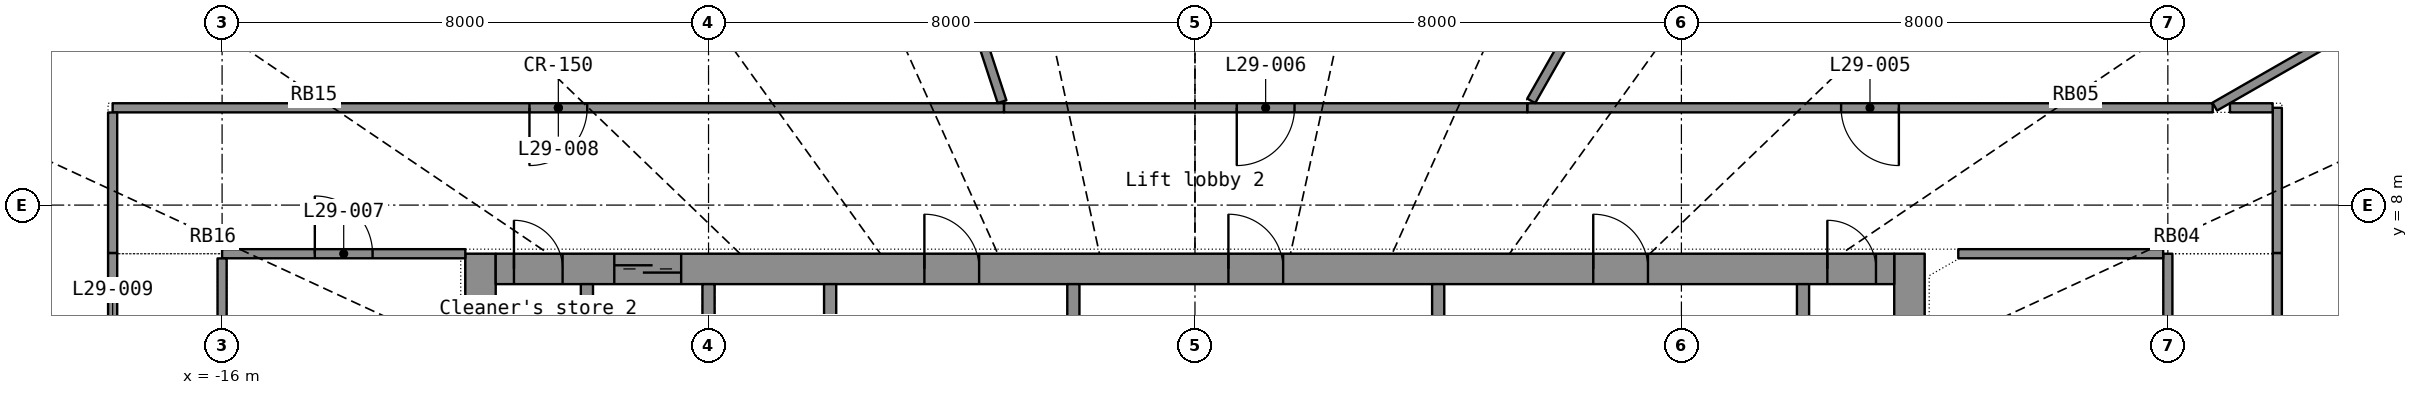
"""IFC4 building model, lengths in metres.
Left out: names, types, materials, properties, quantities, classifications, styles, units other than length and angle.
Written with IfcOpenShell. Run it as: python <this file> out.ifc"""

import sys

from ifc_helpers import new_model, si_unit, direction, frame, frame_2d, origin, place, context, subcontext, project, spatial, rectangle, extrude, element, fill, save


model = new_model("IFC4")
c1 = context("Model", 3, precision=1e-05, world=origin(), true_north=direction((0.0, 1.0)))
c2 = subcontext(c1, "Body", "Model", "MODEL_VIEW")
j1 = project(units=[si_unit("LENGTHUNIT", "METRE"), si_unit("PLANEANGLEUNIT", "RADIAN")], contexts=[c1])
p1 = place(None, origin())
s1 = spatial("IfcSite", under=j1, at=p1, CompositionType="ELEMENT")
p2 = place(p1, origin())
s2 = spatial("IfcBuilding", under=s1, at=p2, CompositionType="ELEMENT")
p3 = place(p2, frame((0.0, 0.0, 123.0)))
s3 = spatial("IfcBuildingStorey", under=s2, at=p3, CompositionType="ELEMENT", Elevation=123.0)
p4 = place(p3, frame((-11.75, -7.2, 0.0), z_axis=(0.0, 0.0, 1.0), x_axis=(0.0, 1.0, 0.0)))
e1 = element("IfcWall", 1, at=p4, inside=s3, PredefinedType="SHEAR", context=c2, shape_type="SweptSolid", body=[
    extrude(rectangle(XDim=14.4, YDim=0.5, at=frame_2d((7.2, 0.0))), origin(), (0.0, 0.0, 1.0), 3.3),
])
p5 = place(p4, frame((6.5, 0.0, 0.0)))
e2 = element("IfcOpeningElement", 2, at=p5, cuts=e1, PredefinedType="OPENING", context=c2, shape_type="SweptSolid", body=[
    extrude(rectangle(XDim=1.4, YDim=2.2, at=frame_2d((0.7, 1.1))), frame((0.0, 0.26, 0.0), z_axis=(0.0, -1.0, 0.0), x_axis=(1.0, 0.0, 0.0)), (0.0, 0.0, 1.0), 0.52),
])
p6 = place(p3, frame((11.75, -7.2, 0.0), z_axis=(0.0, 0.0, 1.0), x_axis=(0.0, 1.0, 0.0)))
e3 = element("IfcWall", 3, at=p6, inside=s3, PredefinedType="SHEAR", context=c2, shape_type="SweptSolid", body=[
    extrude(rectangle(XDim=14.4, YDim=0.5, at=frame_2d((7.2, 0.0))), origin(), (0.0, 0.0, 1.0), 3.3),
])
p7 = place(p6, frame((6.5, 0.0, 0.0)))
e4 = element("IfcOpeningElement", 4, at=p7, cuts=e3, PredefinedType="OPENING", context=c2, shape_type="SweptSolid", body=[
    extrude(rectangle(XDim=1.4, YDim=2.2, at=frame_2d((0.7, 1.1))), frame((0.0, 0.26, 0.0), z_axis=(0.0, -1.0, 0.0), x_axis=(1.0, 0.0, 0.0)), (0.0, 0.0, 1.0), 0.52),
])
p8 = place(p3, frame((-11.5, 6.95, 0.0), z_axis=(0.0, 0.0, 1.0), x_axis=(1.0, 0.0, 0.0)))
e5 = element("IfcWall", 5, at=p8, inside=s3, PredefinedType="SHEAR", context=c2, shape_type="SweptSolid", body=[
    extrude(rectangle(XDim=23.0, YDim=0.5, at=frame_2d((11.5, 0.0))), origin(), (0.0, 0.0, 1.0), 3.3),
])
p9 = place(p8, frame((1.95, 0.0, 0.0)))
e6 = element("IfcOpeningElement", 6, at=p9, cuts=e5, PredefinedType="OPENING", context=c2, shape_type="SweptSolid", body=[
    extrude(rectangle(XDim=1.1, YDim=2.2, at=frame_2d((0.55, 1.1))), frame((0.0, 0.26, 0.0), z_axis=(0.0, -1.0, 0.0), x_axis=(1.0, 0.0, 0.0)), (0.0, 0.0, 1.0), 0.52),
])
p10 = place(p8, frame((7.05, 0.0, 0.0)))
e7 = element("IfcOpeningElement", 7, at=p10, cuts=e5, PredefinedType="OPENING", context=c2, shape_type="SweptSolid", body=[
    extrude(rectangle(XDim=0.9, YDim=2.1, at=frame_2d((0.45, 1.05))), frame((0.0, 0.26, 0.0), z_axis=(0.0, -1.0, 0.0), x_axis=(1.0, 0.0, 0.0)), (0.0, 0.0, 1.0), 0.52),
])
p11 = place(p8, frame((12.05, 0.0, 0.0)))
e8 = element("IfcOpeningElement", 8, at=p11, cuts=e5, PredefinedType="OPENING", context=c2, shape_type="SweptSolid", body=[
    extrude(rectangle(XDim=0.9, YDim=2.1, at=frame_2d((0.45, 1.05))), frame((0.0, 0.26, 0.0), z_axis=(0.0, -1.0, 0.0), x_axis=(1.0, 0.0, 0.0)), (0.0, 0.0, 1.0), 0.52),
])
p12 = place(p8, frame((18.05, 0.0, 0.0)))
e9 = element("IfcOpeningElement", 9, at=p12, cuts=e5, PredefinedType="OPENING", context=c2, shape_type="SweptSolid", body=[
    extrude(rectangle(XDim=0.9, YDim=2.1, at=frame_2d((0.45, 1.05))), frame((0.0, 0.26, 0.0), z_axis=(0.0, -1.0, 0.0), x_axis=(1.0, 0.0, 0.0)), (0.0, 0.0, 1.0), 0.52),
])
p13 = place(p8, frame((0.3, 0.0, 0.0)))
e10 = element("IfcOpeningElement", 10, at=p13, cuts=e5, PredefinedType="OPENING", context=c2, shape_type="SweptSolid", body=[
    extrude(rectangle(XDim=0.8, YDim=2.05, at=frame_2d((0.4, 1.025))), frame((0.0, 0.26, 0.0), z_axis=(0.0, -1.0, 0.0), x_axis=(1.0, 0.0, 0.0)), (0.0, 0.0, 1.0), 0.52),
])
p14 = place(p8, frame((21.9, 0.0, 0.0)))
e11 = element("IfcOpeningElement", 11, at=p14, cuts=e5, PredefinedType="OPENING", context=c2, shape_type="SweptSolid", body=[
    extrude(rectangle(XDim=0.8, YDim=2.05, at=frame_2d((0.4, 1.025))), frame((0.0, 0.26, 0.0), z_axis=(0.0, -1.0, 0.0), x_axis=(1.0, 0.0, 0.0)), (0.0, 0.0, 1.0), 0.52),
])
for number, where, z_axis, x_axis in (
    (12, (-10.0, 3.9, 0.0), (0.0, 0.0, 1.0), (0.0, 1.0, 0.0)),
    (13, (-8.0, 3.9, 0.0), (0.0, 0.0, 1.0), (0.0, 1.0, 0.0)),
    (14, (-6.0, 3.9, 0.0), (0.0, 0.0, 1.0), (0.0, 1.0, 0.0)),
    (15, (10.0, 3.9, 0.0), (0.0, 0.0, 1.0), (0.0, 1.0, 0.0)),
):
    element("IfcWall", number, at=place(p3, frame(where, z_axis=z_axis, x_axis=x_axis)), inside=s3, PredefinedType="SHEAR", context=c2, shape_type="SweptSolid", body=[
        extrude(rectangle(XDim=2.8, YDim=0.2, at=frame_2d((1.4, 0.0))), origin(), (0.0, 0.0, 1.0), 3.3),
    ])
for number, where, z_axis, x_axis in (
    (16, (-2.0, 3.9, 0.0), (0.0, 0.0, 1.0), (0.0, 1.0, 0.0)),
    (17, (4.0, 3.9, 0.0), (0.0, 0.0, 1.0), (0.0, 1.0, 0.0)),
):
    element("IfcWall", number, at=place(p3, frame(where, z_axis=z_axis, x_axis=x_axis)), inside=s3, PredefinedType="PARTITIONING", context=c2, shape_type="SweptSolid", body=[
        extrude(rectangle(XDim=2.8, YDim=0.2, at=frame_2d((1.4, 0.0))), origin(), (0.0, 0.0, 1.0), 3.3),
    ])
p15 = place(p3, frame((-3.14, 9.6, 0.0), z_axis=(0.0, 0.0, 1.0), x_axis=(-1.0, 0.0, 0.0)))
e18 = element("IfcWall", 18, at=p15, inside=s3, PredefinedType="PARTITIONING", context=c2, shape_type="SweptSolid", body=[
    extrude(rectangle(XDim=14.66, YDim=0.15, at=frame_2d((7.33, 0.0))), origin(), (0.0, 0.0, 1.0), 2.4),
])
p16 = place(p15, frame((6.855, 0.0, 0.0)))
e19 = element("IfcOpeningElement", 19, at=p16, cuts=e18, PredefinedType="OPENING", context=c2, shape_type="SweptSolid", body=[
    extrude(rectangle(XDim=0.95, YDim=2.15, at=frame_2d((0.475, 1.075))), frame((0.0, 0.085, 0.0), z_axis=(0.0, -1.0, 0.0), x_axis=(1.0, 0.0, 0.0)), (0.0, 0.0, 1.0), 0.17),
])
p17 = place(p3, frame((16.738, 9.6, 0.0), z_axis=(0.0, 0.0, 1.0), x_axis=(-1.0, 0.0, 0.0)))
e20 = element("IfcWall", 20, at=p17, inside=s3, PredefinedType="PARTITIONING", context=c2, shape_type="SweptSolid", body=[
    extrude(rectangle(XDim=11.273, YDim=0.15, at=frame_2d((5.636, 0.0))), origin(), (0.0, 0.0, 1.0), 2.4),
])
p18 = place(p17, frame((5.161, 0.0, 0.0)))
e21 = element("IfcOpeningElement", 21, at=p18, cuts=e20, PredefinedType="OPENING", context=c2, shape_type="SweptSolid", body=[
    extrude(rectangle(XDim=0.95, YDim=2.15, at=frame_2d((0.475, 1.075))), frame((0.0, 0.085, 0.0), z_axis=(0.0, -1.0, 0.0), x_axis=(1.0, 0.0, 0.0)), (0.0, 0.0, 1.0), 0.17),
])
p19 = place(p3, frame((-6.49, 19.841, 0.0), z_axis=(0.0, 0.0, 1.0), x_axis=(0.310902644, -0.950441763, 0.0)))
e22 = element("IfcWall", 22, at=p19, inside=s3, PredefinedType="PARTITIONING", context=c2, shape_type="SweptSolid", body=[
    extrude(rectangle(XDim=10.669, YDim=0.15, at=frame_2d((5.335, 0.0))), origin(), (0.0, 0.0, 1.0), 2.4),
])
p20 = place(p3, frame((10.598, 18.617, 0.0), z_axis=(0.0, 0.0, 1.0), x_axis=(-0.494739643, -0.869041245, 0.0)))
e23 = element("IfcWall", 23, at=p20, inside=s3, PredefinedType="PARTITIONING", context=c2, shape_type="SweptSolid", body=[
    extrude(rectangle(XDim=10.245, YDim=0.15, at=frame_2d((5.123, 0.0))), origin(), (0.0, 0.0, 1.0), 2.4),
])
p21 = place(p3, frame((5.464, 9.6, 0.0), z_axis=(0.0, 0.0, 1.0), x_axis=(-1.0, 0.0, 0.0)))
e24 = element("IfcWall", 24, at=p21, inside=s3, PredefinedType="PARTITIONING", context=c2, shape_type="SweptSolid", body=[
    extrude(rectangle(XDim=8.604, YDim=0.15, at=frame_2d((4.302, 0.0))), origin(), (0.0, 0.0, 1.0), 2.4),
])
p22 = place(p21, frame((3.827, 0.0, 0.0)))
e25 = element("IfcOpeningElement", 25, at=p22, cuts=e24, PredefinedType="OPENING", context=c2, shape_type="SweptSolid", body=[
    extrude(rectangle(XDim=0.95, YDim=2.15, at=frame_2d((0.475, 1.075))), frame((0.0, 0.085, 0.0), z_axis=(0.0, -1.0, 0.0), x_axis=(1.0, 0.0, 0.0)), (0.0, 0.0, 1.0), 0.17),
])
p23 = place(p3, frame((17.8, -1.276, 0.0), z_axis=(0.0, 0.0, 1.0), x_axis=(0.0, 1.0, 0.0)))
e26 = element("IfcWall", 26, at=p23, inside=s3, PredefinedType="PARTITIONING", context=c2, shape_type="SweptSolid", body=[
    extrude(rectangle(XDim=8.488, YDim=0.15, at=frame_2d((4.244, 0.0))), origin(), (0.0, 0.0, 1.0), 2.4),
])
p24 = place(p23, frame((3.769, 0.0, 0.0)))
e27 = element("IfcOpeningElement", 27, at=p24, cuts=e26, PredefinedType="OPENING", context=c2, shape_type="SweptSolid", body=[
    extrude(rectangle(XDim=0.95, YDim=2.15, at=frame_2d((0.475, 1.075))), frame((0.0, 0.085, 0.0), z_axis=(0.0, -1.0, 0.0), x_axis=(1.0, 0.0, 0.0)), (0.0, 0.0, 1.0), 0.17),
])
p25 = place(p3, frame((16.0, 7.2, 0.0), z_axis=(0.0, 0.0, 1.0), x_axis=(0.0, -1.0, 0.0)))
e28 = element("IfcWall", 28, at=p25, inside=s3, PredefinedType="PARTITIONING", context=c2, shape_type="SweptSolid", body=[
    extrude(rectangle(XDim=6.3, YDim=0.15, at=frame_2d((3.15, 0.0))), origin(), (0.0, 0.0, 1.0), 2.4),
])
p26 = place(p25, frame((2.675, 0.0, 0.0)))
e29 = element("IfcOpeningElement", 29, at=p26, cuts=e28, PredefinedType="OPENING", context=c2, shape_type="SweptSolid", body=[
    extrude(rectangle(XDim=0.95, YDim=2.15, at=frame_2d((0.475, 1.075))), frame((0.0, 0.085, 0.0), z_axis=(0.0, -1.0, 0.0), x_axis=(1.0, 0.0, 0.0)), (0.0, 0.0, 1.0), 0.17),
])
p27 = place(p3, frame((20.553, 11.788, 0.0), z_axis=(0.0, 0.0, 1.0), x_axis=(-0.86746307, -0.497501581, 0.0)))
e30 = element("IfcWall", 30, at=p27, inside=s3, PredefinedType="PARTITIONING", context=c2, shape_type="SweptSolid", body=[
    extrude(rectangle(XDim=4.359, YDim=0.15, at=frame_2d((2.179, 0.0))), origin(), (0.0, 0.0, 1.0), 2.4),
])
p28 = place(p3, frame((-16.0, 7.2, 0.0), z_axis=(0.0, 0.0, 1.0), x_axis=(1.0, 0.0, 0.0)))
e31 = element("IfcWall", 31, at=p28, inside=s3, PredefinedType="PARTITIONING", context=c2, shape_type="SweptSolid", body=[
    extrude(rectangle(XDim=4.0, YDim=0.15, at=frame_2d((2.0, 0.0))), origin(), (0.0, 0.0, 1.0), 2.4),
])
p29 = place(p28, frame((1.525, 0.0, 0.0)))
e32 = element("IfcOpeningElement", 32, at=p29, cuts=e31, PredefinedType="OPENING", context=c2, shape_type="SweptSolid", body=[
    extrude(rectangle(XDim=0.95, YDim=2.15, at=frame_2d((0.475, 1.075))), frame((0.0, 0.085, 0.0), z_axis=(0.0, -1.0, 0.0), x_axis=(1.0, 0.0, 0.0)), (0.0, 0.0, 1.0), 0.17),
])
p30 = place(p3, frame((-16.0, 3.587, 0.0), z_axis=(0.0, 0.0, 1.0), x_axis=(0.0, 1.0, 0.0)))
e33 = element("IfcWall", 33, at=p30, inside=s3, PredefinedType="PARTITIONING", context=c2, shape_type="SweptSolid", body=[
    extrude(rectangle(XDim=3.536, YDim=0.15, at=frame_2d((1.768, 0.0))), origin(), (0.0, 0.0, 1.0), 2.4),
])
p31 = place(p3, frame((12.553, 7.2, 0.0), z_axis=(0.0, 0.0, 1.0), x_axis=(1.0, 0.0, 0.0)))
e34 = element("IfcWall", 34, at=p31, inside=s3, PredefinedType="PARTITIONING", context=c2, shape_type="SweptSolid", body=[
    extrude(rectangle(XDim=3.37, YDim=0.15, at=frame_2d((1.685, 0.0))), origin(), (0.0, 0.0, 1.0), 2.4),
])
p32 = place(p3, frame((-17.8, 7.212, 0.0), z_axis=(0.0, 0.0, 1.0), x_axis=(0.0, -1.0, 0.0)))
e35 = element("IfcWall", 35, at=p32, inside=s3, PredefinedType="PARTITIONING", context=c2, shape_type="SweptSolid", body=[
    extrude(rectangle(XDim=3.21, YDim=0.15, at=frame_2d((1.605, 0.0))), origin(), (0.0, 0.0, 1.0), 2.4),
])
p33 = place(p32, frame((1.13, 0.0, 0.0)))
e36 = element("IfcOpeningElement", 36, at=p33, cuts=e35, PredefinedType="OPENING", context=c2, shape_type="SweptSolid", body=[
    extrude(rectangle(XDim=0.95, YDim=2.15, at=frame_2d((0.475, 1.075))), frame((0.0, 0.085, 0.0), z_axis=(0.0, -1.0, 0.0), x_axis=(1.0, 0.0, 0.0)), (0.0, 0.0, 1.0), 0.17),
])
p34 = place(p3, frame((-17.8, 9.523, 0.0), z_axis=(0.0, 0.0, 1.0), x_axis=(0.0, -1.0, 0.0)))
e37 = element("IfcWall", 37, at=p34, inside=s3, PredefinedType="PARTITIONING", context=c2, shape_type="SweptSolid", body=[
    extrude(rectangle(XDim=2.31, YDim=0.15, at=frame_2d((1.155, 0.0))), origin(), (0.0, 0.0, 1.0), 2.4),
])
p35 = place(p3, frame((17.8, 7.213, 0.0), z_axis=(0.0, 0.0, 1.0), x_axis=(0.0, 1.0, 0.0)))
e38 = element("IfcWall", 38, at=p35, inside=s3, PredefinedType="PARTITIONING", context=c2, shape_type="SweptSolid", body=[
    extrude(rectangle(XDim=2.387, YDim=0.15, at=frame_2d((1.194, 0.0))), origin(), (0.0, 0.0, 1.0), 2.4),
])
p36 = place(p3, frame((17.723, 9.6, 0.0), z_axis=(0.0, 0.0, 1.0), x_axis=(-1.0, 0.0, 0.0)))
e39 = element("IfcWall", 39, at=p36, inside=s3, PredefinedType="PARTITIONING", context=c2, shape_type="SweptSolid", body=[
    extrude(rectangle(XDim=0.701, YDim=0.15, at=frame_2d((0.351, 0.0))), origin(), (0.0, 0.0, 1.0), 2.4),
])
p37 = place(p9, origin())
e40 = element("IfcDoor", 40, at=p37, inside=s3, OperationType="DOUBLE_DOOR_SLIDING", PredefinedType="DOOR", context=c2, shape_type="SweptSolid", body=[
    extrude(rectangle(XDim=1.1, YDim=2.2, at=frame_2d((0.55, 1.1))), frame((0.0, 0.025, 0.0), z_axis=(0.0, -1.0, 0.0), x_axis=(1.0, 0.0, 0.0)), (0.0, 0.0, 1.0), 0.05),
])
fill(e6, e40)
p38 = place(p10, origin())
e41 = element("IfcDoor", 41, at=p38, inside=s3, OperationType="SINGLE_SWING_LEFT", PredefinedType="DOOR", context=c2, shape_type="SweptSolid", body=[
    extrude(rectangle(XDim=0.9, YDim=2.1, at=frame_2d((0.45, 1.05))), frame((0.0, 0.025, 0.0), z_axis=(0.0, -1.0, 0.0), x_axis=(1.0, 0.0, 0.0)), (0.0, 0.0, 1.0), 0.05),
])
fill(e7, e41)
p39 = place(p11, origin())
e42 = element("IfcDoor", 42, at=p39, inside=s3, OperationType="SINGLE_SWING_LEFT", PredefinedType="DOOR", context=c2, shape_type="SweptSolid", body=[
    extrude(rectangle(XDim=0.9, YDim=2.1, at=frame_2d((0.45, 1.05))), frame((0.0, 0.025, 0.0), z_axis=(0.0, -1.0, 0.0), x_axis=(1.0, 0.0, 0.0)), (0.0, 0.0, 1.0), 0.05),
])
fill(e8, e42)
p40 = place(p12, origin())
e43 = element("IfcDoor", 43, at=p40, inside=s3, OperationType="SINGLE_SWING_LEFT", PredefinedType="DOOR", context=c2, shape_type="SweptSolid", body=[
    extrude(rectangle(XDim=0.9, YDim=2.1, at=frame_2d((0.45, 1.05))), frame((0.0, 0.025, 0.0), z_axis=(0.0, -1.0, 0.0), x_axis=(1.0, 0.0, 0.0)), (0.0, 0.0, 1.0), 0.05),
])
fill(e9, e43)
p41 = place(p13, origin())
e44 = element("IfcDoor", 44, at=p41, inside=s3, OperationType="SINGLE_SWING_LEFT", PredefinedType="DOOR", context=c2, shape_type="SweptSolid", body=[
    extrude(rectangle(XDim=0.8, YDim=2.05, at=frame_2d((0.4, 1.025))), frame((0.0, 0.025, 0.0), z_axis=(0.0, -1.0, 0.0), x_axis=(1.0, 0.0, 0.0)), (0.0, 0.0, 1.0), 0.05),
])
fill(e10, e44)
p42 = place(p14, origin())
e45 = element("IfcDoor", 45, at=p42, inside=s3, OperationType="SINGLE_SWING_LEFT", PredefinedType="DOOR", context=c2, shape_type="SweptSolid", body=[
    extrude(rectangle(XDim=0.8, YDim=2.05, at=frame_2d((0.4, 1.025))), frame((0.0, 0.025, 0.0), z_axis=(0.0, -1.0, 0.0), x_axis=(1.0, 0.0, 0.0)), (0.0, 0.0, 1.0), 0.05),
])
fill(e11, e45)
p43 = place(p18, origin())
e46 = element("IfcDoor", 46, at=p43, inside=s3, OperationType="SINGLE_SWING_LEFT", PredefinedType="DOOR", context=c2, shape_type="SweptSolid", body=[
    extrude(rectangle(XDim=0.95, YDim=2.15, at=frame_2d((0.475, 1.075))), frame((0.0, 0.025, 0.0), z_axis=(0.0, -1.0, 0.0), x_axis=(1.0, 0.0, 0.0)), (0.0, 0.0, 1.0), 0.05),
])
fill(e21, e46)
p44 = place(p22, origin())
e47 = element("IfcDoor", 47, at=p44, inside=s3, OperationType="SINGLE_SWING_RIGHT", PredefinedType="DOOR", context=c2, shape_type="SweptSolid", body=[
    extrude(rectangle(XDim=0.95, YDim=2.15, at=frame_2d((0.475, 1.075))), frame((0.0, 0.025, 0.0), z_axis=(0.0, -1.0, 0.0), x_axis=(1.0, 0.0, 0.0)), (0.0, 0.0, 1.0), 0.05),
])
fill(e25, e47)
p45 = place(p29, origin())
e48 = element("IfcDoor", 48, at=p45, inside=s3, OperationType="SINGLE_SWING_LEFT", PredefinedType="DOOR", context=c2, shape_type="SweptSolid", body=[
    extrude(rectangle(XDim=0.95, YDim=2.15, at=frame_2d((0.475, 1.075))), frame((0.0, 0.025, 0.0), z_axis=(0.0, -1.0, 0.0), x_axis=(1.0, 0.0, 0.0)), (0.0, 0.0, 1.0), 0.05),
])
fill(e32, e48)
p46 = place(p16, origin())
e49 = element("IfcDoor", 49, at=p46, inside=s3, OperationType="SINGLE_SWING_RIGHT", PredefinedType="DOOR", context=c2, shape_type="SweptSolid", body=[
    extrude(rectangle(XDim=0.95, YDim=2.15, at=frame_2d((0.475, 1.075))), frame((0.0, 0.025, 0.0), z_axis=(0.0, -1.0, 0.0), x_axis=(1.0, 0.0, 0.0)), (0.0, 0.0, 1.0), 0.05),
])
fill(e19, e49)
save(model, sys.argv[1])
